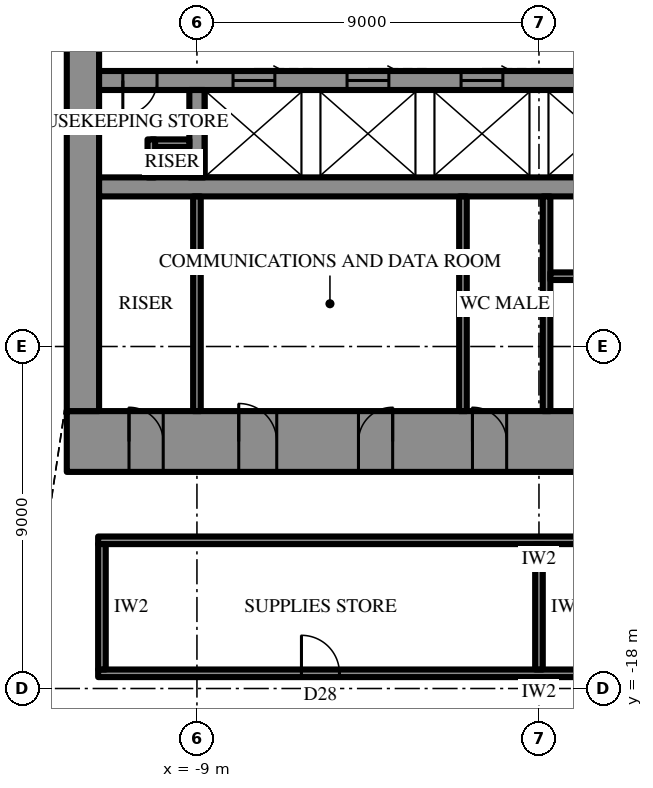
"""IFC4 building model, lengths in metres.
Left out: names, types, materials, properties, quantities, classifications, styles, units other than length and angle.
Written with IfcOpenShell. Run it as: python <this file> out.ifc"""

import sys

from ifc_helpers import new_model, si_unit, direction, frame, frame_2d, origin, place, context, subcontext, project, spatial, rectangle, extrude, element, fill, save


model = new_model("IFC4")
c1 = context("Model", 3, precision=1e-05, world=origin(), true_north=direction((0.0, 1.0)))
c2 = subcontext(c1, "Body", "Model", "MODEL_VIEW")
j1 = project(units=[si_unit("LENGTHUNIT", "METRE"), si_unit("PLANEANGLEUNIT", "RADIAN")], contexts=[c1])
p1 = place(None, origin())
s1 = spatial("IfcSite", under=j1, at=p1, CompositionType="ELEMENT")
p2 = place(p1, origin())
s2 = spatial("IfcBuilding", under=s1, at=p2, CompositionType="ELEMENT")
p3 = place(p2, frame((0.0, 0.0, 345.1)))
s3 = spatial("IfcBuildingStorey", under=s2, at=p3, CompositionType="ELEMENT", Elevation=345.1)
p4 = place(p3, frame((12.425, -11.5, 0.0), z_axis=(0.0, 0.0, 1.0), x_axis=(-1.0, 0.0, 0.0)))
e1 = element("IfcWall", 1, at=p4, inside=s3, PredefinedType="SHEAR", context=c2, shape_type="SweptSolid", body=[
    extrude(rectangle(XDim=24.85, YDim=1.6, at=frame_2d((12.425, 0.0))), origin(), (0.0, 0.0, 1.0), 4.2),
])
p5 = place(p4, frame((13.275, 0.0, 0.0)))
e2 = element("IfcOpeningElement", 2, at=p5, cuts=e1, PredefinedType="OPENING", context=c2, shape_type="SweptSolid", body=[
    extrude(rectangle(XDim=0.9, YDim=2.2, at=frame_2d((0.45, 1.1))), frame((0.0, 0.81, 0.0), z_axis=(0.0, -1.0, 0.0), x_axis=(1.0, 0.0, 0.0)), (0.0, 0.0, 1.0), 1.62),
])
p6 = place(p4, frame((16.275, 0.0, 0.0)))
e3 = element("IfcOpeningElement", 3, at=p6, cuts=e1, PredefinedType="OPENING", context=c2, shape_type="SweptSolid", body=[
    extrude(rectangle(XDim=0.9, YDim=2.2, at=frame_2d((0.45, 1.1))), frame((0.0, 0.81, 0.0), z_axis=(0.0, -1.0, 0.0), x_axis=(1.0, 0.0, 0.0)), (0.0, 0.0, 1.0), 1.62),
])
p7 = place(p4, frame((19.325, 0.0, 0.0)))
e4 = element("IfcOpeningElement", 4, at=p7, cuts=e1, PredefinedType="OPENING", context=c2, shape_type="SweptSolid", body=[
    extrude(rectangle(XDim=1.0, YDim=2.2, at=frame_2d((0.5, 1.1))), frame((0.0, 0.81, 0.0), z_axis=(0.0, -1.0, 0.0), x_axis=(1.0, 0.0, 0.0)), (0.0, 0.0, 1.0), 1.62),
])
p8 = place(p4, frame((1.637, 0.0, 0.0)))
e5 = element("IfcOpeningElement", 5, at=p8, cuts=e1, PredefinedType="OPENING", context=c2, shape_type="SweptSolid", body=[
    extrude(rectangle(XDim=0.9, YDim=2.2, at=frame_2d((0.45, 1.1))), frame((0.0, 0.81, 0.0), z_axis=(0.0, -1.0, 0.0), x_axis=(1.0, 0.0, 0.0)), (0.0, 0.0, 1.0), 1.62),
])
p9 = place(p4, frame((22.312, 0.0, 0.0)))
e6 = element("IfcOpeningElement", 6, at=p9, cuts=e1, PredefinedType="OPENING", context=c2, shape_type="SweptSolid", body=[
    extrude(rectangle(XDim=0.9, YDim=2.2, at=frame_2d((0.45, 1.1))), frame((0.0, 0.81, 0.0), z_axis=(0.0, -1.0, 0.0), x_axis=(1.0, 0.0, 0.0)), (0.0, 0.0, 1.0), 1.62),
])
p10 = place(p3, frame((-12.0, 10.7, 0.0), z_axis=(0.0, 0.0, 1.0), x_axis=(0.0, -1.0, 0.0)))
e7 = element("IfcWall", 7, at=p10, inside=s3, PredefinedType="SHEAR", context=c2, shape_type="SweptSolid", body=[
    extrude(rectangle(XDim=21.4, YDim=0.85, at=frame_2d((10.7, 0.0))), origin(), (0.0, 0.0, 1.0), 4.2),
])
p11 = place(p10, frame((9.8, 0.0, 0.0)))
e8 = element("IfcOpeningElement", 8, at=p11, cuts=e7, PredefinedType="OPENING", context=c2, shape_type="SweptSolid", body=[
    extrude(rectangle(XDim=1.8, YDim=2.4, at=frame_2d((0.9, 1.2))), frame((0.0, 0.435, 0.0), z_axis=(0.0, -1.0, 0.0), x_axis=(1.0, 0.0, 0.0)), (0.0, 0.0, 1.0), 0.87),
])
p12 = place(p3, frame((3.2, -2.0, 0.0), z_axis=(0.0, 0.0, 1.0), x_axis=(-1.0, 0.0, 0.0)))
e9 = element("IfcWall", 9, at=p12, inside=s3, PredefinedType="SHEAR", context=c2, shape_type="SweptSolid", body=[
    extrude(rectangle(XDim=14.775, YDim=0.5, at=frame_2d((7.387, 0.0))), origin(), (0.0, 0.0, 1.0), 4.2),
])
p13 = place(p12, frame((13.25, 0.0, 0.0)))
e10 = element("IfcOpeningElement", 10, at=p13, cuts=e9, PredefinedType="OPENING", context=c2, shape_type="SweptSolid", body=[
    extrude(rectangle(XDim=0.9, YDim=2.2, at=frame_2d((0.45, 1.1))), frame((0.0, 0.26, 0.0), z_axis=(0.0, -1.0, 0.0), x_axis=(1.0, 0.0, 0.0)), (0.0, 0.0, 1.0), 0.52),
])
p14 = place(p12, frame((1.15, 0.0, 0.0)))
e11 = element("IfcOpeningElement", 11, at=p14, cuts=e9, PredefinedType="OPENING", context=c2, shape_type="SweptSolid", body=[
    extrude(rectangle(XDim=1.1, YDim=2.2, at=frame_2d((0.55, 1.1))), frame((0.0, 0.26, 0.0), z_axis=(0.0, -1.0, 0.0), x_axis=(1.0, 0.0, 0.0)), (0.0, 0.0, 1.0), 0.52),
])
p15 = place(p12, frame((4.15, 0.0, 0.0)))
e12 = element("IfcOpeningElement", 12, at=p15, cuts=e9, PredefinedType="OPENING", context=c2, shape_type="SweptSolid", body=[
    extrude(rectangle(XDim=1.1, YDim=2.2, at=frame_2d((0.55, 1.1))), frame((0.0, 0.26, 0.0), z_axis=(0.0, -1.0, 0.0), x_axis=(1.0, 0.0, 0.0)), (0.0, 0.0, 1.0), 0.52),
])
p16 = place(p12, frame((7.15, 0.0, 0.0)))
e13 = element("IfcOpeningElement", 13, at=p16, cuts=e9, PredefinedType="OPENING", context=c2, shape_type="SweptSolid", body=[
    extrude(rectangle(XDim=1.1, YDim=2.2, at=frame_2d((0.55, 1.1))), frame((0.0, 0.26, 0.0), z_axis=(0.0, -1.0, 0.0), x_axis=(1.0, 0.0, 0.0)), (0.0, 0.0, 1.0), 0.52),
])
p17 = place(p12, frame((10.15, 0.0, 0.0)))
e14 = element("IfcOpeningElement", 14, at=p17, cuts=e9, PredefinedType="OPENING", context=c2, shape_type="SweptSolid", body=[
    extrude(rectangle(XDim=1.1, YDim=2.2, at=frame_2d((0.55, 1.1))), frame((0.0, 0.26, 0.0), z_axis=(0.0, -1.0, 0.0), x_axis=(1.0, 0.0, 0.0)), (0.0, 0.0, 1.0), 0.52),
])
p18 = place(p3, frame((11.575, -4.8, 0.0), z_axis=(0.0, 0.0, 1.0), x_axis=(-1.0, 0.0, 0.0)))
e15 = element("IfcWall", 15, at=p18, inside=s3, PredefinedType="SHEAR", context=c2, shape_type="SweptSolid", body=[
    extrude(rectangle(XDim=23.15, YDim=0.5, at=frame_2d((11.575, 0.0))), origin(), (0.0, 0.0, 1.0), 4.2),
])
p19 = place(p18, frame((6.475, 0.0, 0.0)))
e16 = element("IfcOpeningElement", 16, at=p19, cuts=e15, PredefinedType="OPENING", context=c2, shape_type="SweptSolid", body=[
    extrude(rectangle(XDim=1.2, YDim=2.2, at=frame_2d((0.6, 1.1))), frame((0.0, 0.26, 0.0), z_axis=(0.0, -1.0, 0.0), x_axis=(1.0, 0.0, 0.0)), (0.0, 0.0, 1.0), 0.52),
])
p20 = place(p18, frame((3.475, 0.0, 0.0)))
e17 = element("IfcOpeningElement", 17, at=p20, cuts=e15, PredefinedType="OPENING", context=c2, shape_type="SweptSolid", body=[
    extrude(rectangle(XDim=1.2, YDim=2.2, at=frame_2d((0.6, 1.1))), frame((0.0, 0.26, 0.0), z_axis=(0.0, -1.0, 0.0), x_axis=(1.0, 0.0, 0.0)), (0.0, 0.0, 1.0), 0.52),
])
p21 = place(p3, frame((-9.0, -2.25, 0.0), z_axis=(0.0, 0.0, 1.0), x_axis=(0.0, -1.0, 0.0)))
e18 = element("IfcWall", 18, at=p21, inside=s3, PredefinedType="SHEAR", context=c2, shape_type="SweptSolid", body=[
    extrude(rectangle(XDim=2.3, YDim=0.4, at=frame_2d((1.15, 0.0))), origin(), (0.0, 0.0, 1.0), 4.2),
])
p22 = place(p3, frame((0.2, -5.05, 0.0), z_axis=(0.0, 0.0, 1.0), x_axis=(0.0, -1.0, 0.0)))
e19 = element("IfcWall", 19, at=p22, inside=s3, PredefinedType="SHEAR", context=c2, shape_type="SweptSolid", body=[
    extrude(rectangle(XDim=5.65, YDim=0.2, at=frame_2d((2.825, 0.0))), origin(), (0.0, 0.0, 1.0), 4.2),
])
p23 = place(p3, frame((8.9, -7.15, 0.0), z_axis=(0.0, 0.0, 1.0), x_axis=(-1.0, 0.0, 0.0)))
e20 = element("IfcWall", 20, at=p23, inside=s3, PredefinedType="SHEAR", context=c2, shape_type="SweptSolid", body=[
    extrude(rectangle(XDim=8.6, YDim=0.2, at=frame_2d((4.3, 0.0))), origin(), (0.0, 0.0, 1.0), 4.2),
])
p24 = place(p23, frame((0.3, 0.0, 0.0)))
e21 = element("IfcOpeningElement", 21, at=p24, cuts=e20, PredefinedType="OPENING", context=c2, shape_type="SweptSolid", body=[
    extrude(rectangle(XDim=1.0, YDim=2.2, at=frame_2d((0.5, 1.1))), frame((0.0, 0.11, 0.0), z_axis=(0.0, -1.0, 0.0), x_axis=(1.0, 0.0, 0.0)), (0.0, 0.0, 1.0), 0.22),
])
for number, where, z_axis, x_axis in (
    (22, (-9.0, -5.05, 0.0), (0.0, 0.0, 1.0), (0.0, -1.0, 0.0)),
    (23, (-2.0, -5.05, 0.0), (0.0, 0.0, 1.0), (0.0, -1.0, 0.0)),
):
    element("IfcWall", number, at=place(p3, frame(where, z_axis=z_axis, x_axis=x_axis)), inside=s3, PredefinedType="PARTITIONING", context=c2, shape_type="SweptSolid", body=[
        extrude(rectangle(XDim=5.65, YDim=0.2, at=frame_2d((2.825, 0.0))), origin(), (0.0, 0.0, 1.0), 4.0),
    ])
for number, where, z_axis, x_axis in (
    (24, (-9.2, -3.65, 0.0), (0.0, 0.0, 1.0), (-1.0, 0.0, 0.0)),
    (25, (-10.2, -3.55, 0.0), (0.0, 0.0, 1.0), (0.0, -1.0, 0.0)),
):
    element("IfcWall", number, at=place(p3, frame(where, z_axis=z_axis, x_axis=x_axis)), inside=s3, PredefinedType="PARTITIONING", context=c2, shape_type="SweptSolid", body=[
        extrude(rectangle(XDim=1.0, YDim=0.2, at=frame_2d((0.5, 0.0))), origin(), (0.0, 0.0, 1.0), 4.0),
    ])
p25 = place(p3, frame((11.6, -14.1, 0.0), z_axis=(0.0, 0.0, 1.0), x_axis=(-1.0, 0.0, 0.0)))
e26 = element("IfcWall", 26, at=p25, inside=s3, PredefinedType="PARTITIONING", context=c2, shape_type="SweptSolid", body=[
    extrude(rectangle(XDim=23.2, YDim=0.2, at=frame_2d((11.6, 0.0))), origin(), (0.0, 0.0, 1.0), 4.0),
])
p26 = place(p3, frame((11.6, -17.6, 0.0), z_axis=(0.0, 0.0, 1.0), x_axis=(-1.0, 0.0, 0.0)))
e27 = element("IfcWall", 27, at=p26, inside=s3, PredefinedType="PARTITIONING", context=c2, shape_type="SweptSolid", body=[
    extrude(rectangle(XDim=23.2, YDim=0.2, at=frame_2d((11.6, 0.0))), origin(), (0.0, 0.0, 1.0), 4.0),
])
p27 = place(p26, frame((5.35, 0.0, 0.0)))
e28 = element("IfcOpeningElement", 28, at=p27, cuts=e27, PredefinedType="OPENING", context=c2, shape_type="SweptSolid", body=[
    extrude(rectangle(XDim=1.0, YDim=2.2, at=frame_2d((0.5, 1.1))), frame((0.0, 0.11, 0.0), z_axis=(0.0, -1.0, 0.0), x_axis=(1.0, 0.0, 0.0)), (0.0, 0.0, 1.0), 0.22),
])
p28 = place(p26, frame((16.85, 0.0, 0.0)))
e29 = element("IfcOpeningElement", 29, at=p28, cuts=e27, PredefinedType="OPENING", context=c2, shape_type="SweptSolid", body=[
    extrude(rectangle(XDim=1.0, YDim=2.2, at=frame_2d((0.5, 1.1))), frame((0.0, 0.11, 0.0), z_axis=(0.0, -1.0, 0.0), x_axis=(1.0, 0.0, 0.0)), (0.0, 0.0, 1.0), 0.22),
])
p29 = place(p3, frame((0.0, -14.2, 0.0), z_axis=(0.0, 0.0, 1.0), x_axis=(0.0, -1.0, 0.0)))
e30 = element("IfcWall", 30, at=p29, inside=s3, PredefinedType="PARTITIONING", context=c2, shape_type="SweptSolid", body=[
    extrude(rectangle(XDim=3.3, YDim=0.2, at=frame_2d((1.65, 0.0))), origin(), (0.0, 0.0, 1.0), 2.992),
])
p30 = place(p3, frame((-11.5, -14.2, 0.0), z_axis=(0.0, 0.0, 1.0), x_axis=(0.0, -1.0, 0.0)))
e31 = element("IfcWall", 31, at=p30, inside=s3, PredefinedType="PARTITIONING", context=c2, shape_type="SweptSolid", body=[
    extrude(rectangle(XDim=3.3, YDim=0.2, at=frame_2d((1.65, 0.0))), origin(), (0.0, 0.0, 1.0), 4.0),
])
p31 = place(p5, frame((0.9, 0.0, 0.0), z_axis=(0.0, 0.0, 1.0), x_axis=(-1.0, 0.0, 0.0)))
e32 = element("IfcDoor", 32, at=p31, inside=s3, OperationType="SINGLE_SWING_RIGHT", PredefinedType="DOOR", context=c2, shape_type="SweptSolid", body=[
    extrude(rectangle(XDim=0.9, YDim=2.2, at=frame_2d((0.45, 1.1))), frame((0.0, 0.025, 0.0), z_axis=(0.0, -1.0, 0.0), x_axis=(1.0, 0.0, 0.0)), (0.0, 0.0, 1.0), 0.05),
])
fill(e2, e32)
p32 = place(p6, frame((0.9, 0.0, 0.0), z_axis=(0.0, 0.0, 1.0), x_axis=(-1.0, 0.0, 0.0)))
e33 = element("IfcDoor", 33, at=p32, inside=s3, OperationType="SINGLE_SWING_LEFT", PredefinedType="DOOR", context=c2, shape_type="SweptSolid", body=[
    extrude(rectangle(XDim=0.9, YDim=2.2, at=frame_2d((0.45, 1.1))), frame((0.0, 0.025, 0.0), z_axis=(0.0, -1.0, 0.0), x_axis=(1.0, 0.0, 0.0)), (0.0, 0.0, 1.0), 0.05),
])
fill(e3, e33)
p33 = place(p7, frame((1.0, 0.0, 0.0), z_axis=(0.0, 0.0, 1.0), x_axis=(-1.0, 0.0, 0.0)))
e34 = element("IfcDoor", 34, at=p33, inside=s3, OperationType="SINGLE_SWING_RIGHT", PredefinedType="DOOR", context=c2, shape_type="SweptSolid", body=[
    extrude(rectangle(XDim=1.0, YDim=2.2, at=frame_2d((0.5, 1.1))), frame((0.0, 0.025, 0.0), z_axis=(0.0, -1.0, 0.0), x_axis=(1.0, 0.0, 0.0)), (0.0, 0.0, 1.0), 0.05),
])
fill(e4, e34)
p34 = place(p9, frame((0.9, 0.0, 0.0), z_axis=(0.0, 0.0, 1.0), x_axis=(-1.0, 0.0, 0.0)))
e35 = element("IfcDoor", 35, at=p34, inside=s3, OperationType="SINGLE_SWING_RIGHT", PredefinedType="DOOR", context=c2, shape_type="SweptSolid", body=[
    extrude(rectangle(XDim=0.9, YDim=2.2, at=frame_2d((0.45, 1.1))), frame((0.0, 0.025, 0.0), z_axis=(0.0, -1.0, 0.0), x_axis=(1.0, 0.0, 0.0)), (0.0, 0.0, 1.0), 0.05),
])
fill(e6, e35)
p35 = place(p13, origin())
e36 = element("IfcDoor", 36, at=p35, inside=s3, OperationType="SINGLE_SWING_LEFT", PredefinedType="DOOR", context=c2, shape_type="SweptSolid", body=[
    extrude(rectangle(XDim=0.9, YDim=2.2, at=frame_2d((0.45, 1.1))), frame((0.0, 0.025, 0.0), z_axis=(0.0, -1.0, 0.0), x_axis=(1.0, 0.0, 0.0)), (0.0, 0.0, 1.0), 0.05),
])
fill(e10, e36)
p36 = place(p15, frame((1.1, 0.0, 0.0), z_axis=(0.0, 0.0, 1.0), x_axis=(-1.0, 0.0, 0.0)))
e37 = element("IfcDoor", 37, at=p36, inside=s3, OperationType="SLIDING_TO_LEFT", PredefinedType="DOOR", context=c2, shape_type="SweptSolid", body=[
    extrude(rectangle(XDim=1.1, YDim=2.2, at=frame_2d((0.55, 1.1))), frame((0.0, 0.025, 0.0), z_axis=(0.0, -1.0, 0.0), x_axis=(1.0, 0.0, 0.0)), (0.0, 0.0, 1.0), 0.05),
])
fill(e12, e37)
p37 = place(p16, frame((1.1, 0.0, 0.0), z_axis=(0.0, 0.0, 1.0), x_axis=(-1.0, 0.0, 0.0)))
e38 = element("IfcDoor", 38, at=p37, inside=s3, OperationType="SLIDING_TO_LEFT", PredefinedType="DOOR", context=c2, shape_type="SweptSolid", body=[
    extrude(rectangle(XDim=1.1, YDim=2.2, at=frame_2d((0.55, 1.1))), frame((0.0, 0.025, 0.0), z_axis=(0.0, -1.0, 0.0), x_axis=(1.0, 0.0, 0.0)), (0.0, 0.0, 1.0), 0.05),
])
fill(e13, e38)
p38 = place(p17, frame((1.1, 0.0, 0.0), z_axis=(0.0, 0.0, 1.0), x_axis=(-1.0, 0.0, 0.0)))
e39 = element("IfcDoor", 39, at=p38, inside=s3, OperationType="SLIDING_TO_LEFT", PredefinedType="DOOR", context=c2, shape_type="SweptSolid", body=[
    extrude(rectangle(XDim=1.1, YDim=2.2, at=frame_2d((0.55, 1.1))), frame((0.0, 0.025, 0.0), z_axis=(0.0, -1.0, 0.0), x_axis=(1.0, 0.0, 0.0)), (0.0, 0.0, 1.0), 0.05),
])
fill(e14, e39)
p39 = place(p28, frame((1.0, 0.0, 0.0), z_axis=(0.0, 0.0, 1.0), x_axis=(-1.0, 0.0, 0.0)))
e40 = element("IfcDoor", 40, at=p39, inside=s3, OperationType="SINGLE_SWING_RIGHT", PredefinedType="DOOR", context=c2, shape_type="SweptSolid", body=[
    extrude(rectangle(XDim=1.0, YDim=2.2, at=frame_2d((0.5, 1.1))), frame((0.0, 0.025, 0.0), z_axis=(0.0, -1.0, 0.0), x_axis=(1.0, 0.0, 0.0)), (0.0, 0.0, 1.0), 0.05),
])
fill(e29, e40)
save(model, sys.argv[1])
